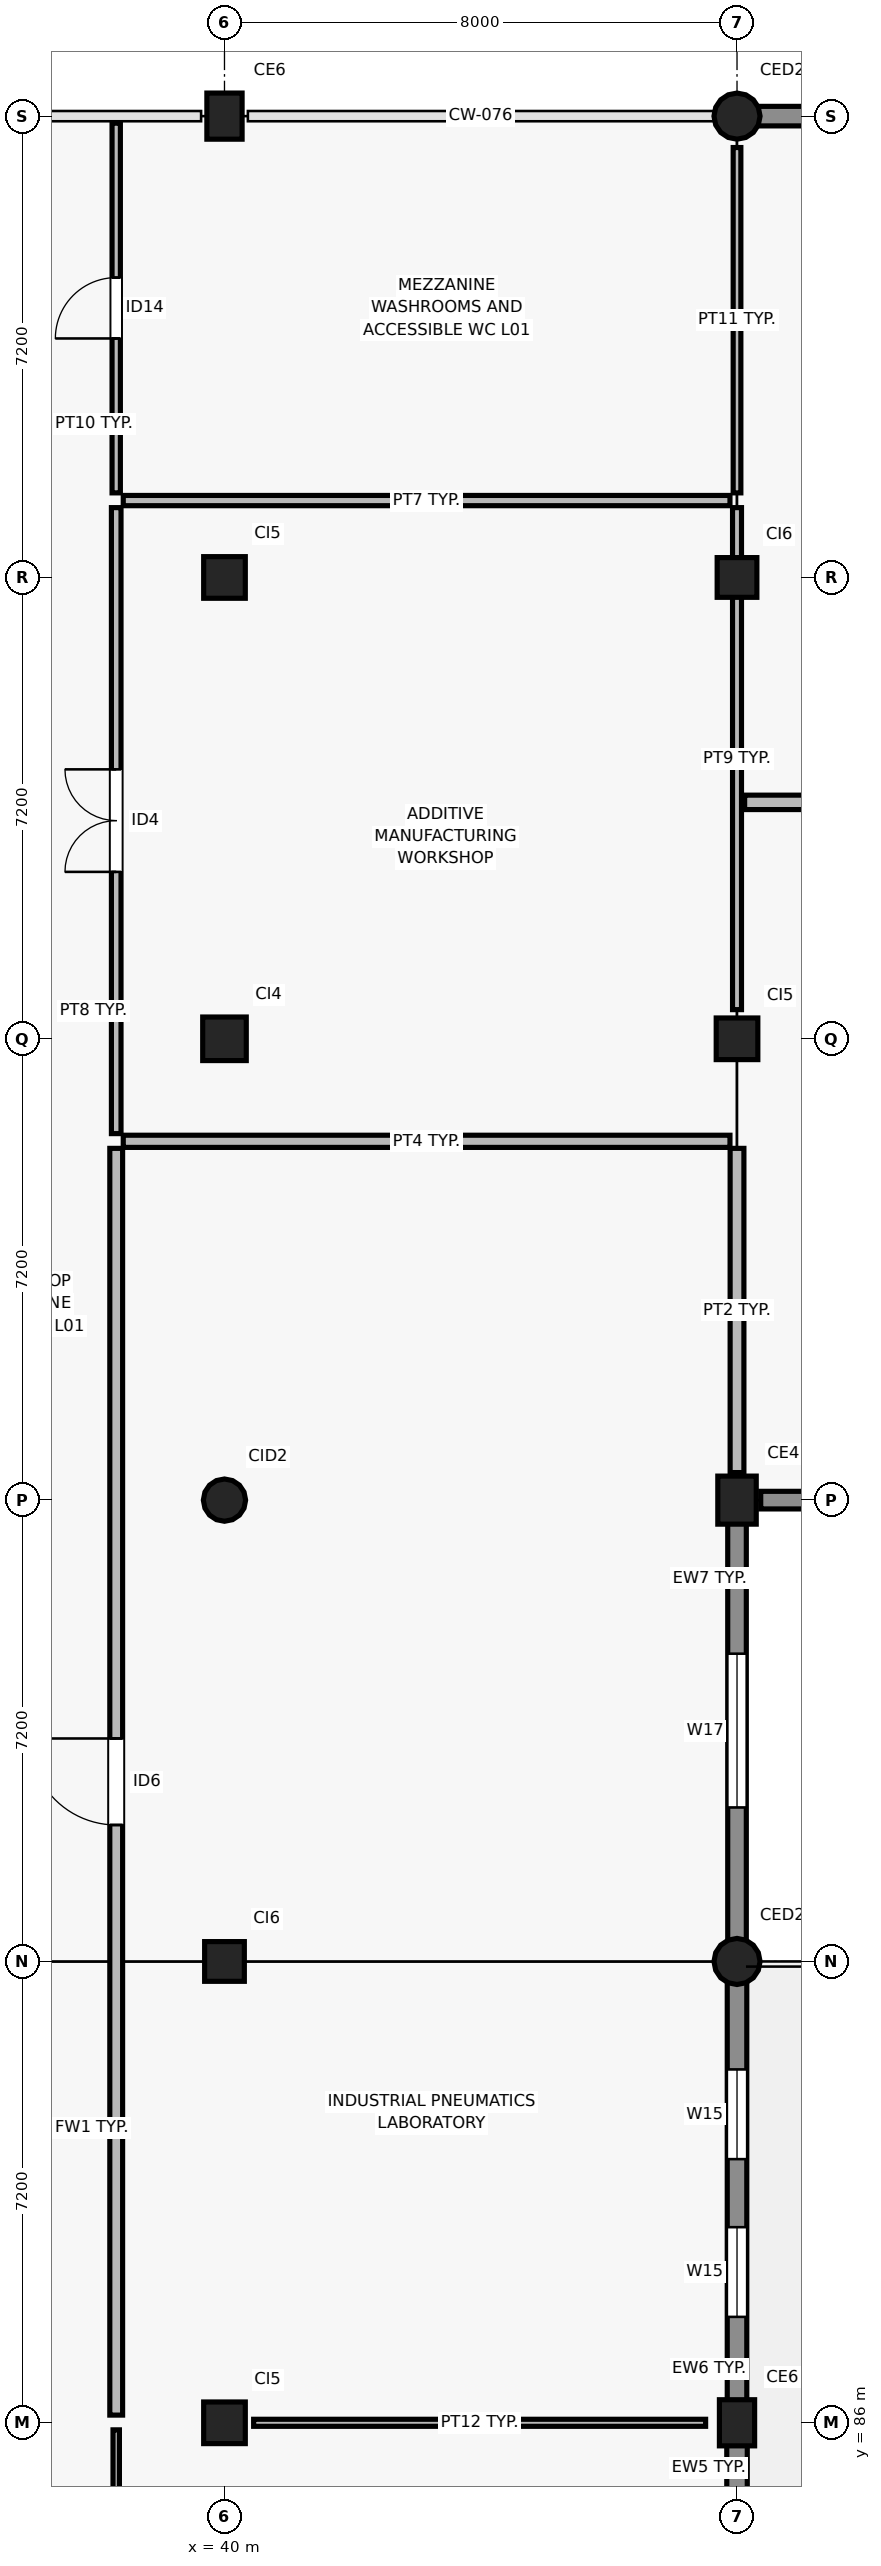
"""IFC4 building model, lengths in metres.
Left out: names, types, materials, properties, quantities, classifications, styles, units other than length and angle.
Written with IfcOpenShell. Run it as: python <this file> out.ifc"""

import sys

from ifc_helpers import new_model, si_unit, direction, frame, frame_2d, origin, origin_2d, place, context, subcontext, project, spatial, rectangle, circle, extrude, element, fill, save


model = new_model("IFC4")
c1 = context("Model", 3, precision=1e-05, world=origin(), true_north=direction((0.0, 1.0)))
c2 = subcontext(c1, "Body", "Model", "MODEL_VIEW")
j1 = project(units=[si_unit("LENGTHUNIT", "METRE"), si_unit("PLANEANGLEUNIT", "RADIAN")], contexts=[c1])
p1 = place(None, origin())
s1 = spatial("IfcSite", under=j1, at=p1, CompositionType="ELEMENT")
p2 = place(p1, origin())
s2 = spatial("IfcBuilding", under=s1, at=p2, CompositionType="ELEMENT")
p3 = place(p2, frame((0.0, 0.0, 4.5)))
s3 = spatial("IfcBuildingStorey", under=s2, at=p3, CompositionType="ELEMENT", Elevation=4.5)
p4 = place(p3, frame((40.0, 86.0, 0.0), z_axis=(0.0, 0.0, 1.0), x_axis=(1.0, 0.0, 0.0)))
e1 = element("IfcColumn", 1, at=p4, inside=s3, PredefinedType="COLUMN", context=c2, shape_type="SweptSolid", body=[
    extrude(rectangle(XDim=0.65, YDim=0.65, at=origin_2d()), origin(), (0.0, 0.0, 1.0), 4.5),
])
p5 = place(p3, frame((40.0, 93.2, 0.0), z_axis=(0.0, 0.0, 1.0), x_axis=(1.0, 0.0, 0.0)))
e2 = element("IfcColumn", 2, at=p5, inside=s3, PredefinedType="COLUMN", context=c2, shape_type="SweptSolid", body=[
    extrude(rectangle(XDim=0.62, YDim=0.62, at=origin_2d()), origin(), (0.0, 0.0, 1.0), 4.5),
])
p6 = place(p3, frame((40.0, 100.4, 0.0), z_axis=(0.0, 0.0, 1.0), x_axis=(1.0, 0.0, 0.0)))
e3 = element("IfcColumn", 3, at=p6, inside=s3, PredefinedType="COLUMN", context=c2, shape_type="SweptSolid", body=[
    extrude(circle(Radius=0.33, at=origin_2d()), origin(), (0.0, 0.0, 1.0), 4.5),
])
p7 = place(p3, frame((40.0, 107.6, 0.0), z_axis=(0.0, 0.0, 1.0), x_axis=(1.0, 0.0, 0.0)))
e4 = element("IfcColumn", 4, at=p7, inside=s3, PredefinedType="COLUMN", context=c2, shape_type="SweptSolid", body=[
    extrude(rectangle(XDim=0.68, YDim=0.68, at=origin_2d()), origin(), (0.0, 0.0, 1.0), 4.5),
])
p8 = place(p3, frame((40.0, 114.8, 0.0), z_axis=(0.0, 0.0, 1.0), x_axis=(1.0, 0.0, 0.0)))
e5 = element("IfcColumn", 5, at=p8, inside=s3, PredefinedType="COLUMN", context=c2, shape_type="SweptSolid", body=[
    extrude(rectangle(XDim=0.65, YDim=0.65, at=origin_2d()), origin(), (0.0, 0.0, 1.0), 4.5),
])
for number, where, z_axis, x_axis in (
    (6, (40.0, 122.0, 0.0), (0.0, 0.0, 1.0), (1.0, 0.0, 0.0)),
    (7, (48.0, 86.0, 0.0), (0.0, 0.0, 1.0), (1.0, 0.0, 0.0)),
):
    element("IfcColumn", number, at=place(p3, frame(where, z_axis=z_axis, x_axis=x_axis)), inside=s3, PredefinedType="COLUMN", context=c2, shape_type="SweptSolid", body=[
        extrude(rectangle(XDim=0.72, YDim=0.55, at=origin_2d()), origin(), (0.0, 0.0, 1.0), 4.5),
    ])
p9 = place(p3, frame((48.0, 93.2, 0.0), z_axis=(0.0, 0.0, 1.0), x_axis=(1.0, 0.0, 0.0)))
e8 = element("IfcColumn", 8, at=p9, inside=s3, PredefinedType="COLUMN", context=c2, shape_type="SweptSolid", body=[
    extrude(circle(Radius=0.36, at=origin_2d()), origin(), (0.0, 0.0, 1.0), 4.5),
])
p10 = place(p3, frame((48.0, 100.4, 0.0), z_axis=(0.0, 0.0, 1.0), x_axis=(1.0, 0.0, 0.0)))
e9 = element("IfcColumn", 9, at=p10, inside=s3, PredefinedType="COLUMN", context=c2, shape_type="SweptSolid", body=[
    extrude(rectangle(XDim=0.75, YDim=0.6, at=origin_2d()), origin(), (0.0, 0.0, 1.0), 4.5),
])
p11 = place(p3, frame((48.0, 107.6, 0.0), z_axis=(0.0, 0.0, 1.0), x_axis=(1.0, 0.0, 0.0)))
e10 = element("IfcColumn", 10, at=p11, inside=s3, PredefinedType="COLUMN", context=c2, shape_type="SweptSolid", body=[
    extrude(rectangle(XDim=0.65, YDim=0.65, at=origin_2d()), origin(), (0.0, 0.0, 1.0), 4.5),
])
p12 = place(p3, frame((48.0, 114.8, 0.0), z_axis=(0.0, 0.0, 1.0), x_axis=(1.0, 0.0, 0.0)))
e11 = element("IfcColumn", 11, at=p12, inside=s3, PredefinedType="COLUMN", context=c2, shape_type="SweptSolid", body=[
    extrude(rectangle(XDim=0.62, YDim=0.62, at=origin_2d()), origin(), (0.0, 0.0, 1.0), 4.5),
])
p13 = place(p3, frame((48.0, 122.0, 0.0), z_axis=(0.0, 0.0, 1.0), x_axis=(1.0, 0.0, 0.0)))
e12 = element("IfcColumn", 12, at=p13, inside=s3, PredefinedType="COLUMN", context=c2, shape_type="SweptSolid", body=[
    extrude(circle(Radius=0.36, at=origin_2d()), origin(), (0.0, 0.0, 1.0), 4.5),
])
p14 = place(p3, frame((48.0, 79.07, 0.0), z_axis=(0.0, 0.0, 1.0), x_axis=(0.0, 1.0, 0.0)))
e13 = element("IfcWall", 13, at=p14, inside=s3, PredefinedType="SOLIDWALL", context=c2, shape_type="SweptSolid", body=[
    extrude(rectangle(XDim=6.66, YDim=0.32, at=frame_2d((3.33, 0.0))), origin(), (0.0, 0.0, 1.0), 3.76),
])
p15 = place(p14, frame((1.127, 0.0, 0.9)))
e14 = element("IfcOpeningElement", 14, at=p15, cuts=e13, PredefinedType="OPENING", context=c2, shape_type="SweptSolid", body=[
    extrude(rectangle(XDim=1.8, YDim=1.5, at=frame_2d((0.9, 0.75))), frame((0.0, 0.17, 0.0), z_axis=(0.0, -1.0, 0.0), x_axis=(1.0, 0.0, 0.0)), (0.0, 0.0, 1.0), 0.34),
])
p16 = place(p14, frame((3.733, 0.0, 0.9)))
e15 = element("IfcOpeningElement", 15, at=p16, cuts=e13, PredefinedType="OPENING", context=c2, shape_type="SweptSolid", body=[
    extrude(rectangle(XDim=1.8, YDim=1.5, at=frame_2d((0.9, 0.75))), frame((0.0, 0.17, 0.0), z_axis=(0.0, -1.0, 0.0), x_axis=(1.0, 0.0, 0.0)), (0.0, 0.0, 1.0), 0.34),
])
p17 = place(p3, frame((48.0, 86.27, 0.0), z_axis=(0.0, 0.0, 1.0), x_axis=(0.0, 1.0, 0.0)))
e16 = element("IfcWall", 16, at=p17, inside=s3, PredefinedType="SOLIDWALL", context=c2, shape_type="SweptSolid", body=[
    extrude(rectangle(XDim=6.628, YDim=0.305, at=frame_2d((3.314, 0.0))), origin(), (0.0, 0.0, 1.0), 3.78),
])
p18 = place(p17, frame((1.383, 0.0, 0.9)))
e17 = element("IfcOpeningElement", 17, at=p18, cuts=e16, PredefinedType="OPENING", context=c2, shape_type="SweptSolid", body=[
    extrude(rectangle(XDim=1.4, YDim=1.5, at=frame_2d((0.7, 0.75))), frame((0.0, 0.162, 0.0), z_axis=(0.0, -1.0, 0.0), x_axis=(1.0, 0.0, 0.0)), (0.0, 0.0, 1.0), 0.325),
])
p19 = place(p17, frame((3.845, 0.0, 0.9)))
e18 = element("IfcOpeningElement", 18, at=p19, cuts=e16, PredefinedType="OPENING", context=c2, shape_type="SweptSolid", body=[
    extrude(rectangle(XDim=1.4, YDim=1.5, at=frame_2d((0.7, 0.75))), frame((0.0, 0.162, 0.0), z_axis=(0.0, -1.0, 0.0), x_axis=(1.0, 0.0, 0.0)), (0.0, 0.0, 1.0), 0.325),
])
p20 = place(p3, frame((48.0, 93.502, 0.0), z_axis=(0.0, 0.0, 1.0), x_axis=(0.0, 1.0, 0.0)))
e19 = element("IfcWall", 19, at=p20, inside=s3, PredefinedType="SOLIDWALL", context=c2, shape_type="SweptSolid", body=[
    extrude(rectangle(XDim=6.603, YDim=0.29, at=frame_2d((3.301, 0.0))), origin(), (0.0, 0.0, 1.0), 3.6),
])
p21 = place(p20, frame((2.101, 0.0, 0.9)))
e20 = element("IfcOpeningElement", 20, at=p21, cuts=e19, PredefinedType="OPENING", context=c2, shape_type="SweptSolid", body=[
    extrude(rectangle(XDim=2.4, YDim=1.25, at=frame_2d((1.2, 0.625))), frame((0.0, 0.155, 0.0), z_axis=(0.0, -1.0, 0.0), x_axis=(1.0, 0.0, 0.0)), (0.0, 0.0, 1.0), 0.31),
])
p22 = place(p3, frame((48.37, 100.4, 0.0), z_axis=(0.0, 0.0, 1.0), x_axis=(1.0, 0.0, 0.0)))
e21 = element("IfcWall", 21, at=p22, inside=s3, PredefinedType="SOLIDWALL", context=c2, shape_type="SweptSolid", body=[
    extrude(rectangle(XDim=7.26, YDim=0.275, at=frame_2d((3.63, 0.0))), origin(), (0.0, 0.0, 1.0), 3.72),
])
p23 = place(p22, frame((1.127, 0.0, 0.9)))
e22 = element("IfcOpeningElement", 22, at=p23, cuts=e21, PredefinedType="OPENING", context=c2, shape_type="SweptSolid", body=[
    extrude(rectangle(XDim=2.1, YDim=1.25, at=frame_2d((1.05, 0.625))), frame((0.0, 0.147, 0.0), z_axis=(0.0, -1.0, 0.0), x_axis=(1.0, 0.0, 0.0)), (0.0, 0.0, 1.0), 0.295),
])
p24 = place(p22, frame((4.033, 0.0, 0.9)))
e23 = element("IfcOpeningElement", 23, at=p24, cuts=e21, PredefinedType="OPENING", context=c2, shape_type="SweptSolid", body=[
    extrude(rectangle(XDim=2.1, YDim=1.25, at=frame_2d((1.05, 0.625))), frame((0.0, 0.147, 0.0), z_axis=(0.0, -1.0, 0.0), x_axis=(1.0, 0.0, 0.0)), (0.0, 0.0, 1.0), 0.295),
])
p25 = place(p3, frame((55.63, 122.0, 0.0), z_axis=(0.0, 0.0, 1.0), x_axis=(-1.0, 0.0, 0.0)))
e24 = element("IfcWall", 24, at=p25, inside=s3, PredefinedType="SOLIDWALL", context=c2, shape_type="SweptSolid", body=[
    extrude(rectangle(XDim=7.327, YDim=0.305, at=frame_2d((3.664, 0.0))), origin(), (0.0, 0.0, 1.0), 3.57),
])
p26 = place(p25, frame((1.216, 0.0, 0.9)))
e25 = element("IfcOpeningElement", 25, at=p26, cuts=e24, PredefinedType="OPENING", context=c2, shape_type="SweptSolid", body=[
    extrude(rectangle(XDim=2.0, YDim=1.5, at=frame_2d((1.0, 0.75))), frame((0.0, 0.162, 0.0), z_axis=(0.0, -1.0, 0.0), x_axis=(1.0, 0.0, 0.0)), (0.0, 0.0, 1.0), 0.325),
])
p27 = place(p25, frame((4.112, 0.0, 0.9)))
e26 = element("IfcOpeningElement", 26, at=p27, cuts=e24, PredefinedType="OPENING", context=c2, shape_type="SweptSolid", body=[
    extrude(rectangle(XDim=2.0, YDim=1.5, at=frame_2d((1.0, 0.75))), frame((0.0, 0.162, 0.0), z_axis=(0.0, -1.0, 0.0), x_axis=(1.0, 0.0, 0.0)), (0.0, 0.0, 1.0), 0.325),
])
p28 = place(p3, frame((40.455, 86.0, 0.0), z_axis=(0.0, 0.0, 1.0), x_axis=(1.0, 0.0, 0.0)))
e27 = element("IfcWall", 27, at=p28, inside=s3, PredefinedType="PARTITIONING", context=c2, shape_type="SweptSolid", body=[
    extrude(rectangle(XDim=7.055, YDim=0.11, at=frame_2d((3.527, 0.0))), origin(), (0.0, 0.0, 1.0), 3.62),
])
p29 = place(p3, frame((38.31, 68.12, 0.0), z_axis=(0.0, 0.0, 1.0), x_axis=(0.0, 1.0, 0.0)))
e28 = element("IfcWall", 28, at=p29, inside=s3, PredefinedType="PARTITIONING", context=c2, shape_type="SweptSolid", body=[
    extrude(rectangle(XDim=17.77, YDim=0.1, at=frame_2d((8.885, 0.0))), origin(), (0.0, 0.0, 1.0), 4.2),
])
p30 = place(p29, frame((8.365, 0.0, 0.0)))
e29 = element("IfcOpeningElement", 29, at=p30, cuts=e28, PredefinedType="OPENING", context=c2, shape_type="SweptSolid", body=[
    extrude(rectangle(XDim=1.04, YDim=2.15, at=frame_2d((0.52, 1.075))), frame((0.0, 0.06, 0.0), z_axis=(0.0, -1.0, 0.0), x_axis=(1.0, 0.0, 0.0)), (0.0, 0.0, 1.0), 0.12),
])
p31 = place(p3, frame((38.42, 106.0, 0.0), z_axis=(0.0, 0.0, 1.0), x_axis=(1.0, 0.0, 0.0)))
e30 = element("IfcWall", 30, at=p31, inside=s3, PredefinedType="PARTITIONING", context=c2, shape_type="SweptSolid", body=[
    extrude(rectangle(XDim=9.47, YDim=0.19, at=frame_2d((4.735, 0.0))), origin(), (0.0, 0.0, 1.0), 4.2),
])
p32 = place(p3, frame((38.31, 86.12, 0.0), z_axis=(0.0, 0.0, 1.0), x_axis=(0.0, 1.0, 0.0)))
e31 = element("IfcWall", 31, at=p32, inside=s3, PredefinedType="SOLIDWALL", context=c2, shape_type="SweptSolid", body=[
    extrude(rectangle(XDim=19.77, YDim=0.2, at=frame_2d((9.885, 0.0))), origin(), (0.0, 0.0, 1.0), 4.2),
])
p33 = place(p32, frame((9.21, 0.0, 0.0)))
e32 = element("IfcOpeningElement", 32, at=p33, cuts=e31, PredefinedType="OPENING", context=c2, shape_type="SweptSolid", body=[
    extrude(rectangle(XDim=1.35, YDim=2.2, at=frame_2d((0.675, 1.1))), frame((0.0, 0.11, 0.0), z_axis=(0.0, -1.0, 0.0), x_axis=(1.0, 0.0, 0.0)), (0.0, 0.0, 1.0), 0.22),
])
p34 = place(p3, frame((48.0, 100.83, 0.0), z_axis=(0.0, 0.0, 1.0), x_axis=(0.0, 1.0, 0.0)))
e33 = element("IfcWall", 33, at=p34, inside=s3, PredefinedType="PARTITIONING", context=c2, shape_type="SweptSolid", body=[
    extrude(rectangle(XDim=5.06, YDim=0.215, at=frame_2d((2.53, 0.0))), origin(), (0.0, 0.0, 1.0), 3.64),
])
p35 = place(p3, frame((38.42, 116.0, 0.0), z_axis=(0.0, 0.0, 1.0), x_axis=(1.0, 0.0, 0.0)))
e34 = element("IfcWall", 34, at=p35, inside=s3, PredefinedType="PARTITIONING", context=c2, shape_type="SweptSolid", body=[
    extrude(rectangle(XDim=9.47, YDim=0.16, at=frame_2d((4.735, 0.0))), origin(), (0.0, 0.0, 1.0), 4.2),
])
p36 = place(p3, frame((38.31, 106.12, 0.0), z_axis=(0.0, 0.0, 1.0), x_axis=(0.0, 1.0, 0.0)))
e35 = element("IfcWall", 35, at=p36, inside=s3, PredefinedType="PARTITIONING", context=c2, shape_type="SweptSolid", body=[
    extrude(rectangle(XDim=9.77, YDim=0.15, at=frame_2d((4.885, 0.0))), origin(), (0.0, 0.0, 1.0), 4.2),
])
p37 = place(p36, frame((4.085, 0.0, 0.0)))
e36 = element("IfcOpeningElement", 36, at=p37, cuts=e35, PredefinedType="OPENING", context=c2, shape_type="SweptSolid", body=[
    extrude(rectangle(XDim=1.6, YDim=2.25, at=frame_2d((0.8, 1.125))), frame((0.0, 0.085, 0.0), z_axis=(0.0, -1.0, 0.0), x_axis=(1.0, 0.0, 0.0)), (0.0, 0.0, 1.0), 0.17),
])
p38 = place(p3, frame((48.0, 108.055, 0.0), z_axis=(0.0, 0.0, 1.0), x_axis=(0.0, 1.0, 0.0)))
e37 = element("IfcWall", 37, at=p38, inside=s3, PredefinedType="PARTITIONING", context=c2, shape_type="SweptSolid", body=[
    extrude(rectangle(XDim=7.835, YDim=0.14, at=frame_2d((3.917, 0.0))), origin(), (0.0, 0.0, 1.0), 3.64),
])
p39 = place(p3, frame((38.31, 116.12, 0.0), z_axis=(0.0, 0.0, 1.0), x_axis=(0.0, 1.0, 0.0)))
e38 = element("IfcWall", 38, at=p39, inside=s3, PredefinedType="PARTITIONING", context=c2, shape_type="SweptSolid", body=[
    extrude(rectangle(XDim=5.77, YDim=0.13, at=frame_2d((2.885, 0.0))), origin(), (0.0, 0.0, 1.0), 4.2),
])
p40 = place(p39, frame((2.41, 0.0, 0.0)))
e39 = element("IfcOpeningElement", 39, at=p40, cuts=e38, PredefinedType="OPENING", context=c2, shape_type="SweptSolid", body=[
    extrude(rectangle(XDim=0.95, YDim=2.1, at=frame_2d((0.475, 1.05))), frame((0.0, 0.075, 0.0), z_axis=(0.0, -1.0, 0.0), x_axis=(1.0, 0.0, 0.0)), (0.0, 0.0, 1.0), 0.15),
])
p41 = place(p3, frame((48.0, 116.12, 0.0), z_axis=(0.0, 0.0, 1.0), x_axis=(0.0, 1.0, 0.0)))
e40 = element("IfcWall", 40, at=p41, inside=s3, PredefinedType="PARTITIONING", context=c2, shape_type="SweptSolid", body=[
    extrude(rectangle(XDim=5.39, YDim=0.12, at=frame_2d((2.695, 0.0))), origin(), (0.0, 0.0, 1.0), 3.7),
])
p42 = place(p3, frame((48.119, 111.29, 0.0), z_axis=(0.0, 0.0, 1.0), x_axis=(1.0, 0.0, 0.0)))
e41 = element("IfcWall", 41, at=p42, inside=s3, PredefinedType="PARTITIONING", context=c2, shape_type="SweptSolid", body=[
    extrude(rectangle(XDim=31.771, YDim=0.225, at=frame_2d((15.885, 0.0))), origin(), (0.0, 0.0, 1.0), 3.76),
])
p43 = place(p42, frame((15.245, 0.0, 0.0)))
e42 = element("IfcOpeningElement", 42, at=p43, cuts=e41, PredefinedType="OPENING", context=c2, shape_type="SweptSolid", body=[
    extrude(rectangle(XDim=1.28, YDim=2.2, at=frame_2d((0.64, 1.1))), frame((0.0, 0.123, 0.0), z_axis=(0.0, -1.0, 0.0), x_axis=(1.0, 0.0, 0.0)), (0.0, 0.0, 1.0), 0.245),
])
p44 = place(p18, origin())
e43 = element("IfcWindow", 43, at=p44, inside=s3, PartitioningType="SINGLE_PANEL", PredefinedType="WINDOW", context=c2, shape_type="SweptSolid", body=[
    extrude(rectangle(XDim=1.4, YDim=1.5, at=frame_2d((0.7, 0.75))), frame((0.0, 0.03, 0.0), z_axis=(0.0, -1.0, 0.0), x_axis=(1.0, 0.0, 0.0)), (0.0, 0.0, 1.0), 0.06),
])
fill(e17, e43)
p45 = place(p19, origin())
e44 = element("IfcWindow", 44, at=p45, inside=s3, PartitioningType="SINGLE_PANEL", PredefinedType="WINDOW", context=c2, shape_type="SweptSolid", body=[
    extrude(rectangle(XDim=1.4, YDim=1.5, at=frame_2d((0.7, 0.75))), frame((0.0, 0.03, 0.0), z_axis=(0.0, -1.0, 0.0), x_axis=(1.0, 0.0, 0.0)), (0.0, 0.0, 1.0), 0.06),
])
fill(e18, e44)
p46 = place(p21, origin())
e45 = element("IfcWindow", 45, at=p46, inside=s3, PartitioningType="SINGLE_PANEL", PredefinedType="WINDOW", context=c2, shape_type="SweptSolid", body=[
    extrude(rectangle(XDim=2.4, YDim=1.25, at=frame_2d((1.2, 0.625))), frame((0.0, 0.03, 0.0), z_axis=(0.0, -1.0, 0.0), x_axis=(1.0, 0.0, 0.0)), (0.0, 0.0, 1.0), 0.06),
])
fill(e20, e45)
p47 = place(p33, origin())
e46 = element("IfcDoor", 46, at=p47, inside=s3, OperationType="SINGLE_SWING_RIGHT", PredefinedType="DOOR", context=c2, shape_type="SweptSolid", body=[
    extrude(rectangle(XDim=1.35, YDim=2.2, at=frame_2d((0.675, 1.1))), frame((0.0, 0.025, 0.0), z_axis=(0.0, -1.0, 0.0), x_axis=(1.0, 0.0, 0.0)), (0.0, 0.0, 1.0), 0.05),
])
fill(e32, e46)
p48 = place(p37, origin())
e47 = element("IfcDoor", 47, at=p48, inside=s3, OperationType="DOUBLE_DOOR_SINGLE_SWING", PredefinedType="DOOR", context=c2, shape_type="SweptSolid", body=[
    extrude(rectangle(XDim=1.6, YDim=2.25, at=frame_2d((0.8, 1.125))), frame((0.0, 0.025, 0.0), z_axis=(0.0, -1.0, 0.0), x_axis=(1.0, 0.0, 0.0)), (0.0, 0.0, 1.0), 0.05),
])
fill(e36, e47)
p49 = place(p40, origin())
e48 = element("IfcDoor", 48, at=p49, inside=s3, OperationType="SINGLE_SWING_LEFT", PredefinedType="DOOR", context=c2, shape_type="SweptSolid", body=[
    extrude(rectangle(XDim=0.95, YDim=2.1, at=frame_2d((0.475, 1.05))), frame((0.0, 0.025, 0.0), z_axis=(0.0, -1.0, 0.0), x_axis=(1.0, 0.0, 0.0)), (0.0, 0.0, 1.0), 0.05),
])
fill(e39, e48)
save(model, sys.argv[1])
